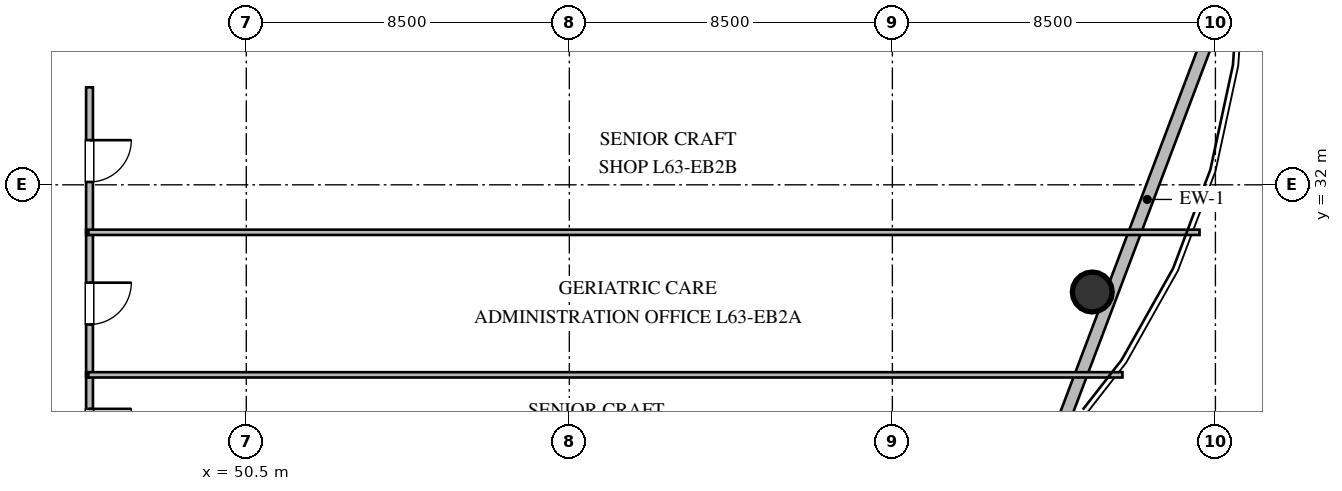
"""IFC4 building model, lengths in metres.
Left out: names, types, materials, properties, quantities, classifications, styles, units other than length and angle.
Written with IfcOpenShell. Run it as: python <this file> out.ifc"""

import sys

from ifc_helpers import new_model, si_unit, direction, frame, frame_2d, origin, origin_2d, place, context, subcontext, project, spatial, rectangle, circle, extrude, element, fill, save


model = new_model("IFC4")
c1 = context("Model", 3, precision=1e-05, world=origin(), true_north=direction((0.0, 1.0)))
c2 = subcontext(c1, "Body", "Model", "MODEL_VIEW")
j1 = project(units=[si_unit("LENGTHUNIT", "METRE"), si_unit("PLANEANGLEUNIT", "RADIAN")], contexts=[c1])
p1 = place(None, origin())
s1 = spatial("IfcSite", under=j1, at=p1, CompositionType="ELEMENT")
p2 = place(p1, origin())
s2 = spatial("IfcBuilding", under=s1, at=p2, CompositionType="ELEMENT")
p3 = place(p2, frame((0.0, 0.0, 238.8)))
s3 = spatial("IfcBuildingStorey", under=s2, at=p3, CompositionType="ELEMENT", Elevation=238.8)
p4 = place(p3, frame((72.76, 29.18, 0.0), z_axis=(0.0, 0.0, 1.0), x_axis=(1.0, 0.0, 0.0)))
e1 = element("IfcColumn", 1, at=p4, inside=s3, PredefinedType="COLUMN", context=c2, shape_type="SweptSolid", body=[
    extrude(circle(Radius=0.525, at=origin_2d()), origin(), (0.0, 0.0, 1.0), 3.6),
])
p5 = place(p3, frame((76.712, 38.243, 0.0), z_axis=(0.0, 0.0, 1.0), x_axis=(-0.353659523244, -0.935374225441, 0.0)))
e2 = element("IfcWall", 2, at=p5, inside=s3, PredefinedType="STANDARD", context=c2, shape_type="SweptSolid", body=[
    extrude(rectangle(XDim=14.172, YDim=0.32, at=frame_2d((7.086, 0.0))), origin(), (0.0, 0.0, 1.0), 3.36),
])
p6 = place(p3, frame((46.375, 27.065, 0.0), z_axis=(0.0, 0.0, 1.0), x_axis=(0.0, -1.0, 0.0)))
e3 = element("IfcWall", 3, at=p6, inside=s3, PredefinedType="PARTITIONING", context=c2, shape_type="SweptSolid", body=[
    extrude(rectangle(XDim=3.02, YDim=0.18, at=frame_2d((1.51, 0.0))), origin(), (0.0, 0.0, 1.0), 3.36),
])
p7 = place(p6, frame((0.96, 0.0, 0.0)))
e4 = element("IfcOpeningElement", 4, at=p7, cuts=e3, PredefinedType="OPENING", context=c2, shape_type="SweptSolid", body=[
    extrude(rectangle(XDim=1.1, YDim=2.1, at=frame_2d((0.55, 1.05))), frame((0.0, 0.1, 0.0), z_axis=(0.0, -1.0, 0.0), x_axis=(1.0, 0.0, 0.0)), (0.0, 0.0, 1.0), 0.2),
])
p8 = place(p3, frame((46.375, 30.815, 0.0), z_axis=(0.0, 0.0, 1.0), x_axis=(0.0, -1.0, 0.0)))
e5 = element("IfcWall", 5, at=p8, inside=s3, PredefinedType="PARTITIONING", context=c2, shape_type="SweptSolid", body=[
    extrude(rectangle(XDim=3.88, YDim=0.18, at=frame_2d((1.94, 0.0))), origin(), (0.0, 0.0, 1.0), 3.36),
])
p9 = place(p8, frame((1.39, 0.0, 0.0)))
e6 = element("IfcOpeningElement", 6, at=p9, cuts=e5, PredefinedType="OPENING", context=c2, shape_type="SweptSolid", body=[
    extrude(rectangle(XDim=1.1, YDim=2.1, at=frame_2d((0.55, 1.05))), frame((0.0, 0.1, 0.0), z_axis=(0.0, -1.0, 0.0), x_axis=(1.0, 0.0, 0.0)), (0.0, 0.0, 1.0), 0.2),
])
p10 = place(p3, frame((46.375, 34.565, 0.0), z_axis=(0.0, 0.0, 1.0), x_axis=(0.0, -1.0, 0.0)))
e7 = element("IfcWall", 7, at=p10, inside=s3, PredefinedType="PARTITIONING", context=c2, shape_type="SweptSolid", body=[
    extrude(rectangle(XDim=3.88, YDim=0.18, at=frame_2d((1.94, 0.0))), origin(), (0.0, 0.0, 1.0), 3.36),
])
p11 = place(p10, frame((1.39, 0.0, 0.0)))
e8 = element("IfcOpeningElement", 8, at=p11, cuts=e7, PredefinedType="OPENING", context=c2, shape_type="SweptSolid", body=[
    extrude(rectangle(XDim=1.1, YDim=2.1, at=frame_2d((0.55, 1.05))), frame((0.0, 0.1, 0.0), z_axis=(0.0, -1.0, 0.0), x_axis=(1.0, 0.0, 0.0)), (0.0, 0.0, 1.0), 0.2),
])
p12 = place(p3, frame((46.345, 27.0, 0.0), z_axis=(0.0, 0.0, 1.0), x_axis=(1.0, 0.0, 0.0)))
e9 = element("IfcWall", 9, at=p12, inside=s3, PredefinedType="PARTITIONING", context=c2, shape_type="SweptSolid", body=[
    extrude(rectangle(XDim=27.209, YDim=0.14, at=frame_2d((13.604, 0.0))), origin(), (0.0, 0.0, 1.0), 2.89),
])
p13 = place(p3, frame((46.345, 30.75, 0.0), z_axis=(0.0, 0.0, 1.0), x_axis=(1.0, 0.0, 0.0)))
e10 = element("IfcWall", 10, at=p13, inside=s3, PredefinedType="PARTITIONING", context=c2, shape_type="SweptSolid", body=[
    extrude(rectangle(XDim=29.237, YDim=0.14, at=frame_2d((14.619, 0.0))), origin(), (0.0, 0.0, 1.0), 3.36),
])
p14 = place(p7, origin())
e11 = element("IfcDoor", 11, at=p14, inside=s3, OperationType="SINGLE_SWING_LEFT", PredefinedType="DOOR", context=c2, shape_type="SweptSolid", body=[
    extrude(rectangle(XDim=1.1, YDim=2.1, at=frame_2d((0.55, 1.05))), frame((0.0, 0.025, 0.0), z_axis=(0.0, -1.0, 0.0), x_axis=(1.0, 0.0, 0.0)), (0.0, 0.0, 1.0), 0.05),
])
fill(e4, e11)
p15 = place(p9, origin())
e12 = element("IfcDoor", 12, at=p15, inside=s3, OperationType="SINGLE_SWING_LEFT", PredefinedType="DOOR", context=c2, shape_type="SweptSolid", body=[
    extrude(rectangle(XDim=1.1, YDim=2.1, at=frame_2d((0.55, 1.05))), frame((0.0, 0.025, 0.0), z_axis=(0.0, -1.0, 0.0), x_axis=(1.0, 0.0, 0.0)), (0.0, 0.0, 1.0), 0.05),
])
fill(e6, e12)
p16 = place(p11, origin())
e13 = element("IfcDoor", 13, at=p16, inside=s3, OperationType="SINGLE_SWING_LEFT", PredefinedType="DOOR", context=c2, shape_type="SweptSolid", body=[
    extrude(rectangle(XDim=1.1, YDim=2.1, at=frame_2d((0.55, 1.05))), frame((0.0, 0.025, 0.0), z_axis=(0.0, -1.0, 0.0), x_axis=(1.0, 0.0, 0.0)), (0.0, 0.0, 1.0), 0.05),
])
fill(e8, e13)
save(model, sys.argv[1])
